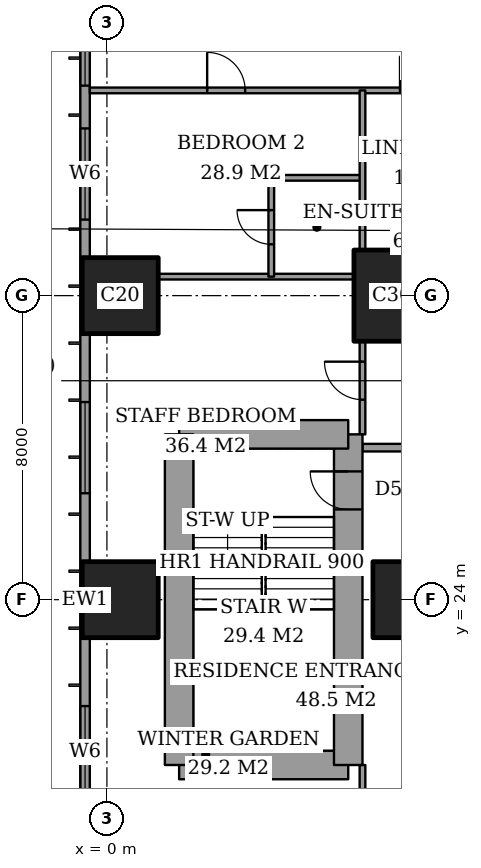
"""IFC4 building model, lengths in metres.
Left out: names, types, materials, properties, quantities, classifications, styles, units other than length and angle.
Written with IfcOpenShell. Run it as: python <this file> out.ifc"""

import sys

from ifc_helpers import new_model, si_unit, direction, frame, frame_2d, origin, origin_2d, place, context, subcontext, project, spatial, rectangle, extrude, element, fill, save


model = new_model("IFC4")
c1 = context("Model", 3, precision=1e-05, world=origin(), true_north=direction((0.0, 1.0)))
c2 = subcontext(c1, "Body", "Model", "MODEL_VIEW")
j1 = project(units=[si_unit("LENGTHUNIT", "METRE"), si_unit("PLANEANGLEUNIT", "RADIAN")], contexts=[c1])
p1 = place(None, origin())
s1 = spatial("IfcSite", under=j1, at=p1, CompositionType="ELEMENT")
p2 = place(p1, origin())
s2 = spatial("IfcBuilding", under=s1, at=p2, CompositionType="ELEMENT")
p3 = place(p2, frame((0.0, 0.0, 40.4)))
s3 = spatial("IfcBuildingStorey", under=s2, at=p3, CompositionType="ELEMENT", Elevation=40.4)
for number, where, z_axis, x_axis in (
    (1, (0.35, 24.0, 0.0), (0.0, 0.0, 1.0), (1.0, 0.0, 0.0)),
    (2, (0.35, 32.0, 0.0), (0.0, 0.0, 1.0), (1.0, 0.0, 0.0)),
    (3, (8.0, 24.0, 0.0), (0.0, 0.0, 1.0), (1.0, 0.0, 0.0)),
):
    element("IfcColumn", number, at=place(p3, frame(where, z_axis=z_axis, x_axis=x_axis)), inside=s3, PredefinedType="COLUMN", context=c2, shape_type="SweptSolid", body=[
        extrude(rectangle(XDim=2.0, YDim=2.0, at=origin_2d()), origin(), (0.0, 0.0, 1.0), 3.6),
    ])
p4 = place(p3, frame((8.0, 32.0, 0.0), z_axis=(0.0, 0.0, 1.0), x_axis=(1.0, 0.0, 0.0)))
e4 = element("IfcColumn", 4, at=p4, inside=s3, PredefinedType="COLUMN", context=c2, shape_type="SweptSolid", body=[
    extrude(rectangle(XDim=3.0, YDim=2.4, at=origin_2d()), origin(), (0.0, 0.0, 1.0), 3.6),
])
p5 = place(p3, frame((1.9, 19.65, 0.0), z_axis=(0.0, 0.0, 1.0), x_axis=(1.0, 0.0, 0.0)))
e5 = element("IfcWall", 5, at=p5, inside=s3, PredefinedType="SHEAR", context=c2, shape_type="SweptSolid", body=[
    extrude(rectangle(XDim=4.45, YDim=0.75, at=frame_2d((2.225, 0.0))), origin(), (0.0, 0.0, 1.0), 3.6),
])
p6 = place(p3, frame((6.35, 19.65, 0.0), z_axis=(0.0, 0.0, 1.0), x_axis=(0.0, 1.0, 0.0)))
e6 = element("IfcWall", 6, at=p6, inside=s3, PredefinedType="SHEAR", context=c2, shape_type="SweptSolid", body=[
    extrude(rectangle(XDim=8.7, YDim=0.75, at=frame_2d((4.35, 0.0))), origin(), (0.0, 0.0, 1.0), 3.6),
])
p7 = place(p6, frame((6.725, 0.0, 0.0)))
e7 = element("IfcOpeningElement", 7, at=p7, cuts=e6, PredefinedType="OPENING", context=c2, shape_type="SweptSolid", body=[
    extrude(rectangle(XDim=1.0, YDim=2.1, at=frame_2d((0.5, 1.05))), frame((0.0, 0.385, 0.0), z_axis=(0.0, -1.0, 0.0), x_axis=(1.0, 0.0, 0.0)), (0.0, 0.0, 1.0), 0.77),
])
p8 = place(p3, frame((6.35, 28.35, 0.0), z_axis=(0.0, 0.0, 1.0), x_axis=(-1.0, 0.0, 0.0)))
e8 = element("IfcWall", 8, at=p8, inside=s3, PredefinedType="SHEAR", context=c2, shape_type="SweptSolid", body=[
    extrude(rectangle(XDim=4.45, YDim=0.75, at=frame_2d((2.225, 0.0))), origin(), (0.0, 0.0, 1.0), 3.6),
])
p9 = place(p3, frame((1.9, 28.35, 0.0), z_axis=(0.0, 0.0, 1.0), x_axis=(0.0, -1.0, 0.0)))
e9 = element("IfcWall", 9, at=p9, inside=s3, PredefinedType="SHEAR", context=c2, shape_type="SweptSolid", body=[
    extrude(rectangle(XDim=8.7, YDim=0.75, at=frame_2d((4.35, 0.0))), origin(), (0.0, 0.0, 1.0), 3.6),
])
p10 = place(p3, frame((-0.575, 44.825, 0.0), z_axis=(0.0, 0.0, 1.0), x_axis=(0.0, -1.0, 0.0)))
e10 = element("IfcWall", 10, at=p10, inside=s3, PredefinedType="SOLIDWALL", context=c2, shape_type="SweptSolid", body=[
    extrude(rectangle(XDim=41.65, YDim=0.25, at=frame_2d((20.825, 0.0))), origin(), (0.0, 0.0, 1.0), 3.6),
])
p11 = place(p10, frame((0.775, 0.0, 0.6)))
e11 = element("IfcOpeningElement", 11, at=p11, cuts=e10, PredefinedType="OPENING", context=c2, shape_type="SweptSolid", body=[
    extrude(rectangle(XDim=2.4, YDim=2.0, at=frame_2d((1.2, 1.0))), frame((0.0, 0.135, 0.0), z_axis=(0.0, -1.0, 0.0), x_axis=(1.0, 0.0, 0.0)), (0.0, 0.0, 1.0), 0.27),
])
p12 = place(p10, frame((6.1, 0.0, 0.6)))
e12 = element("IfcOpeningElement", 12, at=p12, cuts=e10, PredefinedType="OPENING", context=c2, shape_type="SweptSolid", body=[
    extrude(rectangle(XDim=1.2, YDim=2.0, at=frame_2d((0.6, 1.0))), frame((0.0, 0.135, 0.0), z_axis=(0.0, -1.0, 0.0), x_axis=(1.0, 0.0, 0.0)), (0.0, 0.0, 1.0), 0.27),
])
p13 = place(p10, frame((8.425, 0.0, 0.6)))
e13 = element("IfcOpeningElement", 13, at=p13, cuts=e10, PredefinedType="OPENING", context=c2, shape_type="SweptSolid", body=[
    extrude(rectangle(XDim=2.4, YDim=2.0, at=frame_2d((1.2, 1.0))), frame((0.0, 0.135, 0.0), z_axis=(0.0, -1.0, 0.0), x_axis=(1.0, 0.0, 0.0)), (0.0, 0.0, 1.0), 0.27),
])
p14 = place(p10, frame((15.625, 0.0, 0.6)))
e14 = element("IfcOpeningElement", 14, at=p14, cuts=e10, PredefinedType="OPENING", context=c2, shape_type="SweptSolid", body=[
    extrude(rectangle(XDim=2.4, YDim=2.0, at=frame_2d((1.2, 1.0))), frame((0.0, 0.135, 0.0), z_axis=(0.0, -1.0, 0.0), x_axis=(1.0, 0.0, 0.0)), (0.0, 0.0, 1.0), 0.27),
])
p15 = place(p10, frame((23.625, 0.0, 0.6)))
e15 = element("IfcOpeningElement", 15, at=p15, cuts=e10, PredefinedType="OPENING", context=c2, shape_type="SweptSolid", body=[
    extrude(rectangle(XDim=2.4, YDim=2.0, at=frame_2d((1.2, 1.0))), frame((0.0, 0.135, 0.0), z_axis=(0.0, -1.0, 0.0), x_axis=(1.0, 0.0, 0.0)), (0.0, 0.0, 1.0), 0.27),
])
p16 = place(p10, frame((30.825, 0.0, 0.6)))
e16 = element("IfcOpeningElement", 16, at=p16, cuts=e10, PredefinedType="OPENING", context=c2, shape_type="SweptSolid", body=[
    extrude(rectangle(XDim=2.4, YDim=2.0, at=frame_2d((1.2, 1.0))), frame((0.0, 0.135, 0.0), z_axis=(0.0, -1.0, 0.0), x_axis=(1.0, 0.0, 0.0)), (0.0, 0.0, 1.0), 0.27),
])
p17 = place(p10, frame((34.5, 0.0, 0.6)))
e17 = element("IfcOpeningElement", 17, at=p17, cuts=e10, PredefinedType="OPENING", context=c2, shape_type="SweptSolid", body=[
    extrude(rectangle(XDim=1.2, YDim=2.0, at=frame_2d((0.6, 1.0))), frame((0.0, 0.135, 0.0), z_axis=(0.0, -1.0, 0.0), x_axis=(1.0, 0.0, 0.0)), (0.0, 0.0, 1.0), 0.27),
])
p18 = place(p10, frame((38.475, 0.0, 0.6)))
e18 = element("IfcOpeningElement", 18, at=p18, cuts=e10, PredefinedType="OPENING", context=c2, shape_type="SweptSolid", body=[
    extrude(rectangle(XDim=2.4, YDim=2.0, at=frame_2d((1.2, 1.0))), frame((0.0, 0.135, 0.0), z_axis=(0.0, -1.0, 0.0), x_axis=(1.0, 0.0, 0.0)), (0.0, 0.0, 1.0), 0.27),
])
p19 = place(p3, frame((6.725, 28.0, 0.0), z_axis=(0.0, 0.0, 1.0), x_axis=(1.0, 0.0, 0.0)))
e19 = element("IfcWall", 19, at=p19, inside=s3, PredefinedType="PARTITIONING", context=c2, shape_type="SweptSolid", body=[
    extrude(rectangle(XDim=17.275, YDim=0.2, at=frame_2d((8.637, 0.0))), origin(), (0.0, 0.0, 1.0), 3.35),
])
p20 = place(p19, frame((6.475, 0.0, 0.0)))
e20 = element("IfcOpeningElement", 20, at=p20, cuts=e19, PredefinedType="OPENING", context=c2, shape_type="SweptSolid", body=[
    extrude(rectangle(XDim=1.2, YDim=2.4, at=frame_2d((0.6, 1.2))), frame((0.0, 0.11, 0.0), z_axis=(0.0, -1.0, 0.0), x_axis=(1.0, 0.0, 0.0)), (0.0, 0.0, 1.0), 0.22),
])
p21 = place(p3, frame((1.35, 32.5, 0.0), z_axis=(0.0, 0.0, 1.0), x_axis=(1.0, 0.0, 0.0)))
e21 = element("IfcWall", 21, at=p21, inside=s3, PredefinedType="PARTITIONING", context=c2, shape_type="SweptSolid", body=[
    extrude(rectangle(XDim=5.15, YDim=0.15, at=frame_2d((2.575, 0.0))), origin(), (0.0, 0.0, 1.0), 3.35),
])
p22 = place(p3, frame((4.325, 35.1, 0.0), z_axis=(0.0, 0.0, 1.0), x_axis=(1.0, 0.0, 0.0)))
e22 = element("IfcWall", 22, at=p22, inside=s3, PredefinedType="PARTITIONING", context=c2, shape_type="SweptSolid", body=[
    extrude(rectangle(XDim=2.4, YDim=0.15, at=frame_2d((1.2, 0.0))), origin(), (0.0, 0.0, 1.0), 3.35),
])
p23 = place(p3, frame((-0.45, 37.4, 0.0), z_axis=(0.0, 0.0, 1.0), x_axis=(1.0, 0.0, 0.0)))
e23 = element("IfcWall", 23, at=p23, inside=s3, PredefinedType="PARTITIONING", context=c2, shape_type="SweptSolid", body=[
    extrude(rectangle(XDim=25.011, YDim=0.15, at=frame_2d((12.505, 0.0))), origin(), (0.0, 0.0, 1.0), 3.35),
])
p24 = place(p23, frame((10.65, 0.0, 0.0)))
e24 = element("IfcOpeningElement", 24, at=p24, cuts=e23, PredefinedType="OPENING", context=c2, shape_type="SweptSolid", body=[
    extrude(rectangle(XDim=1.0, YDim=2.1, at=frame_2d((0.5, 1.05))), frame((0.0, 0.085, 0.0), z_axis=(0.0, -1.0, 0.0), x_axis=(1.0, 0.0, 0.0)), (0.0, 0.0, 1.0), 0.17),
])
p25 = place(p23, frame((3.087, 0.0, 0.0)))
e25 = element("IfcOpeningElement", 25, at=p25, cuts=e23, PredefinedType="OPENING", context=c2, shape_type="SweptSolid", body=[
    extrude(rectangle(XDim=1.0, YDim=2.1, at=frame_2d((0.5, 1.05))), frame((0.0, 0.085, 0.0), z_axis=(0.0, -1.0, 0.0), x_axis=(1.0, 0.0, 0.0)), (0.0, 0.0, 1.0), 0.17),
])
p26 = place(p23, frame((8.163, 0.0, 0.0)))
e26 = element("IfcOpeningElement", 26, at=p26, cuts=e23, PredefinedType="OPENING", context=c2, shape_type="SweptSolid", body=[
    extrude(rectangle(XDim=0.9, YDim=2.1, at=frame_2d((0.45, 1.05))), frame((0.0, 0.085, 0.0), z_axis=(0.0, -1.0, 0.0), x_axis=(1.0, 0.0, 0.0)), (0.0, 0.0, 1.0), 0.17),
])
p27 = place(p23, frame((13.35, 0.0, 0.0)))
e27 = element("IfcOpeningElement", 27, at=p27, cuts=e23, PredefinedType="OPENING", context=c2, shape_type="SweptSolid", body=[
    extrude(rectangle(XDim=1.0, YDim=2.1, at=frame_2d((0.5, 1.05))), frame((0.0, 0.085, 0.0), z_axis=(0.0, -1.0, 0.0), x_axis=(1.0, 0.0, 0.0)), (0.0, 0.0, 1.0), 0.17),
])
p28 = place(p23, frame((16.45, 0.0, 0.0)))
e28 = element("IfcOpeningElement", 28, at=p28, cuts=e23, PredefinedType="OPENING", context=c2, shape_type="SweptSolid", body=[
    extrude(rectangle(XDim=1.0, YDim=2.1, at=frame_2d((0.5, 1.05))), frame((0.0, 0.085, 0.0), z_axis=(0.0, -1.0, 0.0), x_axis=(1.0, 0.0, 0.0)), (0.0, 0.0, 1.0), 0.17),
])
p29 = place(p23, frame((21.175, 0.0, 0.0)))
e29 = element("IfcOpeningElement", 29, at=p29, cuts=e23, PredefinedType="OPENING", context=c2, shape_type="SweptSolid", body=[
    extrude(rectangle(XDim=1.0, YDim=2.1, at=frame_2d((0.5, 1.05))), frame((0.0, 0.085, 0.0), z_axis=(0.0, -1.0, 0.0), x_axis=(1.0, 0.0, 0.0)), (0.0, 0.0, 1.0), 0.17),
])
p30 = place(p3, frame((4.325, 32.5, 0.0), z_axis=(0.0, 0.0, 1.0), x_axis=(0.0, 1.0, 0.0)))
e30 = element("IfcWall", 30, at=p30, inside=s3, PredefinedType="PARTITIONING", context=c2, shape_type="SweptSolid", body=[
    extrude(rectangle(XDim=2.6, YDim=0.15, at=frame_2d((1.3, 0.0))), origin(), (0.0, 0.0, 1.0), 3.35),
])
p31 = place(p30, frame((0.85, 0.0, 0.0)))
e31 = element("IfcOpeningElement", 31, at=p31, cuts=e30, PredefinedType="OPENING", context=c2, shape_type="SweptSolid", body=[
    extrude(rectangle(XDim=0.9, YDim=2.1, at=frame_2d((0.45, 1.05))), frame((0.0, 0.085, 0.0), z_axis=(0.0, -1.0, 0.0), x_axis=(1.0, 0.0, 0.0)), (0.0, 0.0, 1.0), 0.17),
])
p32 = place(p3, frame((6.725, 17.2, 0.0), z_axis=(0.0, 0.0, 1.0), x_axis=(0.0, 1.0, 0.0)))
e32 = element("IfcWall", 32, at=p32, inside=s3, PredefinedType="PARTITIONING", context=c2, shape_type="SweptSolid", body=[
    extrude(rectangle(XDim=2.45, YDim=0.15, at=frame_2d((1.225, 0.0))), origin(), (0.0, 0.0, 1.0), 3.35),
])
p33 = place(p32, frame((0.538, 0.0, 0.0)))
e33 = element("IfcOpeningElement", 33, at=p33, cuts=e32, PredefinedType="OPENING", context=c2, shape_type="SweptSolid", body=[
    extrude(rectangle(XDim=1.0, YDim=2.1, at=frame_2d((0.5, 1.05))), frame((0.0, 0.085, 0.0), z_axis=(0.0, -1.0, 0.0), x_axis=(1.0, 0.0, 0.0)), (0.0, 0.0, 1.0), 0.17),
])
p34 = place(p3, frame((6.725, 28.35, 0.0), z_axis=(0.0, 0.0, 1.0), x_axis=(0.0, 1.0, 0.0)))
e34 = element("IfcWall", 34, at=p34, inside=s3, PredefinedType="PARTITIONING", context=c2, shape_type="SweptSolid", body=[
    extrude(rectangle(XDim=2.45, YDim=0.15, at=frame_2d((1.225, 0.0))), origin(), (0.0, 0.0, 1.0), 3.35),
])
p35 = place(p34, frame((0.913, 0.0, 0.0)))
e35 = element("IfcOpeningElement", 35, at=p35, cuts=e34, PredefinedType="OPENING", context=c2, shape_type="SweptSolid", body=[
    extrude(rectangle(XDim=1.0, YDim=2.1, at=frame_2d((0.5, 1.05))), frame((0.0, 0.085, 0.0), z_axis=(0.0, -1.0, 0.0), x_axis=(1.0, 0.0, 0.0)), (0.0, 0.0, 1.0), 0.17),
])
p36 = place(p3, frame((6.725, 33.2, 0.0), z_axis=(0.0, 0.0, 1.0), x_axis=(0.0, 1.0, 0.0)))
e36 = element("IfcWall", 36, at=p36, inside=s3, PredefinedType="PARTITIONING", context=c2, shape_type="SweptSolid", body=[
    extrude(rectangle(XDim=4.2, YDim=0.15, at=frame_2d((2.1, 0.0))), origin(), (0.0, 0.0, 1.0), 3.35),
])
p37 = place(p12, origin())
e37 = element("IfcWindow", 37, at=p37, inside=s3, PartitioningType="SINGLE_PANEL", PredefinedType="WINDOW", context=c2, shape_type="SweptSolid", body=[
    extrude(rectangle(XDim=1.2, YDim=2.0, at=frame_2d((0.6, 1.0))), frame((0.0, 0.03, 0.0), z_axis=(0.0, -1.0, 0.0), x_axis=(1.0, 0.0, 0.0)), (0.0, 0.0, 1.0), 0.06),
])
fill(e12, e37)
p38 = place(p13, origin())
e38 = element("IfcWindow", 38, at=p38, inside=s3, PartitioningType="SINGLE_PANEL", PredefinedType="WINDOW", context=c2, shape_type="SweptSolid", body=[
    extrude(rectangle(XDim=2.4, YDim=2.0, at=frame_2d((1.2, 1.0))), frame((0.0, 0.03, 0.0), z_axis=(0.0, -1.0, 0.0), x_axis=(1.0, 0.0, 0.0)), (0.0, 0.0, 1.0), 0.06),
])
fill(e13, e38)
p39 = place(p14, origin())
e39 = element("IfcWindow", 39, at=p39, inside=s3, PartitioningType="SINGLE_PANEL", PredefinedType="WINDOW", context=c2, shape_type="SweptSolid", body=[
    extrude(rectangle(XDim=2.4, YDim=2.0, at=frame_2d((1.2, 1.0))), frame((0.0, 0.03, 0.0), z_axis=(0.0, -1.0, 0.0), x_axis=(1.0, 0.0, 0.0)), (0.0, 0.0, 1.0), 0.06),
])
fill(e14, e39)
p40 = place(p15, origin())
e40 = element("IfcWindow", 40, at=p40, inside=s3, PartitioningType="SINGLE_PANEL", PredefinedType="WINDOW", context=c2, shape_type="SweptSolid", body=[
    extrude(rectangle(XDim=2.4, YDim=2.0, at=frame_2d((1.2, 1.0))), frame((0.0, 0.03, 0.0), z_axis=(0.0, -1.0, 0.0), x_axis=(1.0, 0.0, 0.0)), (0.0, 0.0, 1.0), 0.06),
])
fill(e15, e40)
p41 = place(p31, origin())
e41 = element("IfcDoor", 41, at=p41, inside=s3, OperationType="SINGLE_SWING_LEFT", PredefinedType="DOOR", context=c2, shape_type="SweptSolid", body=[
    extrude(rectangle(XDim=0.9, YDim=2.1, at=frame_2d((0.45, 1.05))), frame((0.0, 0.025, 0.0), z_axis=(0.0, -1.0, 0.0), x_axis=(1.0, 0.0, 0.0)), (0.0, 0.0, 1.0), 0.05),
])
fill(e31, e41)
p42 = place(p25, origin())
e42 = element("IfcDoor", 42, at=p42, inside=s3, OperationType="SINGLE_SWING_RIGHT", PredefinedType="DOOR", context=c2, shape_type="SweptSolid", body=[
    extrude(rectangle(XDim=1.0, YDim=2.1, at=frame_2d((0.5, 1.05))), frame((0.0, 0.025, 0.0), z_axis=(0.0, -1.0, 0.0), x_axis=(1.0, 0.0, 0.0)), (0.0, 0.0, 1.0), 0.05),
])
fill(e25, e42)
p43 = place(p35, origin())
e43 = element("IfcDoor", 43, at=p43, inside=s3, OperationType="SINGLE_SWING_LEFT", PredefinedType="DOOR", context=c2, shape_type="SweptSolid", body=[
    extrude(rectangle(XDim=1.0, YDim=2.1, at=frame_2d((0.5, 1.05))), frame((0.0, 0.025, 0.0), z_axis=(0.0, -1.0, 0.0), x_axis=(1.0, 0.0, 0.0)), (0.0, 0.0, 1.0), 0.05),
])
fill(e35, e43)
p44 = place(p26, origin())
e44 = element("IfcDoor", 44, at=p44, inside=s3, OperationType="SINGLE_SWING_RIGHT", PredefinedType="DOOR", context=c2, shape_type="SweptSolid", body=[
    extrude(rectangle(XDim=0.9, YDim=2.1, at=frame_2d((0.45, 1.05))), frame((0.0, 0.025, 0.0), z_axis=(0.0, -1.0, 0.0), x_axis=(1.0, 0.0, 0.0)), (0.0, 0.0, 1.0), 0.05),
])
fill(e26, e44)
p45 = place(p7, origin())
e45 = element("IfcDoor", 45, at=p45, inside=s3, OperationType="SINGLE_SWING_LEFT", PredefinedType="DOOR", context=c2, shape_type="SweptSolid", body=[
    extrude(rectangle(XDim=1.0, YDim=2.1, at=frame_2d((0.5, 1.05))), frame((0.0, 0.025, 0.0), z_axis=(0.0, -1.0, 0.0), x_axis=(1.0, 0.0, 0.0)), (0.0, 0.0, 1.0), 0.05),
])
fill(e7, e45)
save(model, sys.argv[1])
